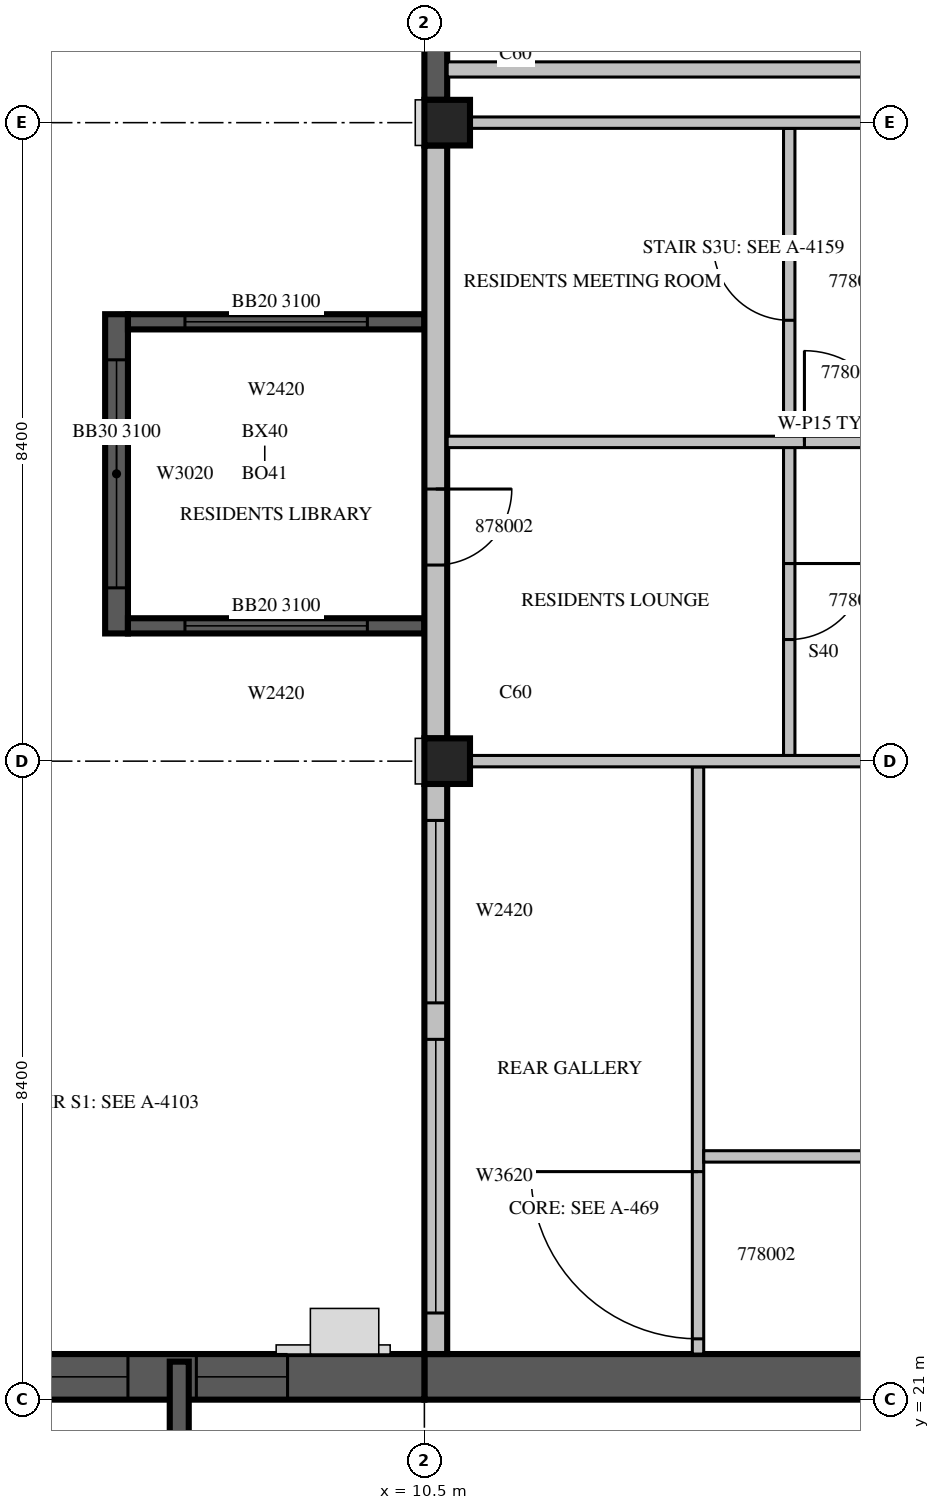
"""IFC4 building model, lengths in metres.
Left out: names, types, materials, properties, quantities, classifications, styles, units other than length and angle.
Written with IfcOpenShell. Run it as: python <this file> out.ifc"""

import sys

from ifc_helpers import new_model, si_unit, direction, frame, frame_2d, origin, origin_2d, place, context, subcontext, project, spatial, rectangle, extrude, source, transform, mapped, element, fill, save


model = new_model("IFC4")
c1 = context("Model", 3, precision=1e-05, world=origin(), true_north=direction((0.0, 1.0)))
c2 = subcontext(c1, "Body", "Model", "MODEL_VIEW")
j1 = project(units=[si_unit("LENGTHUNIT", "METRE"), si_unit("PLANEANGLEUNIT", "RADIAN")], contexts=[c1])
p1 = place(None, origin())
s1 = spatial("IfcSite", under=j1, at=p1, CompositionType="ELEMENT")
p2 = place(p1, origin())
s2 = spatial("IfcBuilding", under=s1, at=p2, CompositionType="ELEMENT")
p3 = place(p2, frame((0.0, 0.0, 333.5)))
s3 = spatial("IfcBuildingStorey", under=s2, at=p3, CompositionType="ELEMENT", Elevation=333.5)
m1 = source(origin(), c2, "Body", "SweptSolid", [
    extrude(rectangle(XDim=0.6, YDim=0.6, at=origin_2d()), origin(), (0.0, 0.0, 1.0), 3.5),
])
for number, where, z_axis, x_axis in (
    (1, (10.8, 29.4, 0.0), (0.0, 0.0, 1.0), (1.0, 0.0, 0.0)),
    (2, (10.8, 37.8, 0.0), (0.0, 0.0, 1.0), (1.0, 0.0, 0.0)),
):
    element("IfcColumn", number, at=place(p3, frame(where, z_axis=z_axis, x_axis=x_axis)), inside=s3, PredefinedType="COLUMN", context=c2, shape_type="MappedRepresentation", body=[
        mapped(m1, transform((0.0, 0.0, 0.0), scale=1.0)),
    ])
m2 = source(origin(), c2, "Body", "SweptSolid", [
    extrude(rectangle(XDim=11.1, YDim=0.6, at=frame_2d((5.55, 0.0))), origin(), (0.0, 0.0, 1.0), 3.5),
])
p4 = place(p3, frame((10.5, 21.3, 0.0), z_axis=(0.0, 0.0, 1.0), x_axis=(1.0, 0.0, 0.0)))
e3 = element("IfcWall", 3, at=p4, inside=s3, PredefinedType="SHEAR", context=c2, shape_type="MappedRepresentation", body=[
    mapped(m2, transform((0.0, 0.0, 0.0), scale=1.0)),
])
m3 = source(origin(), c2, "Body", "SweptSolid", [
    extrude(rectangle(XDim=1.2, YDim=2.1, at=frame_2d((0.6, 1.05))), frame((0.0, 0.31, 0.0), z_axis=(0.0, -1.0, 0.0), x_axis=(1.0, 0.0, 0.0)), (0.0, 0.0, 1.0), 0.62),
])
p5 = place(p4, frame((8.7, 0.0, 0.0)))
e4 = element("IfcOpeningElement", 4, at=p5, cuts=e3, PredefinedType="OPENING", context=c2, shape_type="MappedRepresentation", body=[
    mapped(m3, transform((0.0, 0.0, 0.0), scale=1.0)),
])
m4 = source(origin(), c2, "Body", "SweptSolid", [
    extrude(rectangle(XDim=6.6, YDim=0.6, at=frame_2d((3.3, 0.0))), origin(), (0.0, 0.0, 1.0), 3.5),
])
p6 = place(p3, frame((3.9, 21.3, 0.0), z_axis=(0.0, 0.0, 1.0), x_axis=(1.0, 0.0, 0.0)))
e5 = element("IfcWall", 5, at=p6, inside=s3, PredefinedType="SHEAR", context=c2, shape_type="MappedRepresentation", body=[
    mapped(m4, transform((0.0, 0.0, 0.0), scale=1.0)),
])
m5 = source(origin(), c2, "Body", "SweptSolid", [
    extrude(rectangle(XDim=1.2, YDim=2.4, at=frame_2d((0.6, 1.2))), frame((0.0, 0.31, 0.0), z_axis=(0.0, -1.0, 0.0), x_axis=(1.0, 0.0, 0.0)), (0.0, 0.0, 1.0), 0.62),
])
p7 = place(p6, frame((1.5, 0.0, 0.6)))
e6 = element("IfcOpeningElement", 6, at=p7, cuts=e5, PredefinedType="OPENING", context=c2, shape_type="MappedRepresentation", body=[
    mapped(m5, transform((0.0, 0.0, 0.0), scale=1.0)),
])
p8 = place(p6, frame((3.6, 0.0, 0.6)))
e7 = element("IfcOpeningElement", 7, at=p8, cuts=e5, PredefinedType="OPENING", context=c2, shape_type="MappedRepresentation", body=[
    mapped(m5, transform((0.0, 0.0, 0.0), scale=1.0)),
])
m6 = source(origin(), c2, "Body", "SweptSolid", [
    extrude(rectangle(XDim=4.2, YDim=0.3, at=frame_2d((2.1, 0.0))), origin(), (0.0, 0.0, 1.0), 3.1),
])
p9 = place(p3, frame((6.45, 35.28, 0.0), z_axis=(0.0, 0.0, 1.0), x_axis=(0.0, -1.0, 0.0)))
e8 = element("IfcWall", 8, at=p9, inside=s3, PredefinedType="SOLIDWALL", context=c2, shape_type="MappedRepresentation", body=[
    mapped(m6, transform((0.0, 0.0, 0.0), scale=1.0)),
])
m7 = source(origin(), c2, "Body", "SweptSolid", [
    extrude(rectangle(XDim=3.0, YDim=2.0, at=frame_2d((1.5, 1.0))), frame((0.0, 0.16, 0.0), z_axis=(0.0, -1.0, 0.0), x_axis=(1.0, 0.0, 0.0)), (0.0, 0.0, 1.0), 0.32),
])
p10 = place(p9, frame((0.6, 0.0, 0.6)))
e9 = element("IfcOpeningElement", 9, at=p10, cuts=e8, PredefinedType="OPENING", context=c2, shape_type="MappedRepresentation", body=[
    mapped(m7, transform((0.0, 0.0, 0.0), scale=1.0)),
])
m8 = source(origin(), c2, "Body", "SweptSolid", [
    extrude(rectangle(XDim=3.9, YDim=0.2, at=frame_2d((1.95, 0.0))), origin(), (0.0, 0.0, 1.0), 3.1),
])
p11 = place(p3, frame((10.5, 35.18, 0.0), z_axis=(0.0, 0.0, 1.0), x_axis=(-1.0, 0.0, 0.0)))
e10 = element("IfcWall", 10, at=p11, inside=s3, PredefinedType="SOLIDWALL", context=c2, shape_type="MappedRepresentation", body=[
    mapped(m8, transform((0.0, 0.0, 0.0), scale=1.0)),
])
m9 = source(origin(), c2, "Body", "SweptSolid", [
    extrude(rectangle(XDim=2.4, YDim=2.0, at=frame_2d((1.2, 1.0))), frame((0.0, 0.11, 0.0), z_axis=(0.0, -1.0, 0.0), x_axis=(1.0, 0.0, 0.0)), (0.0, 0.0, 1.0), 0.22),
])
p12 = place(p11, frame((0.75, 0.0, 0.6)))
e11 = element("IfcOpeningElement", 11, at=p12, cuts=e10, PredefinedType="OPENING", context=c2, shape_type="MappedRepresentation", body=[
    mapped(m9, transform((0.0, 0.0, 0.0), scale=1.0)),
])
p13 = place(p3, frame((10.5, 31.18, 0.0), z_axis=(0.0, 0.0, 1.0), x_axis=(-1.0, 0.0, 0.0)))
e12 = element("IfcWall", 12, at=p13, inside=s3, PredefinedType="SOLIDWALL", context=c2, shape_type="MappedRepresentation", body=[
    mapped(m8, transform((0.0, 0.0, 0.0), scale=1.0)),
])
p14 = place(p13, frame((0.75, 0.0, 0.6)))
e13 = element("IfcOpeningElement", 13, at=p14, cuts=e12, PredefinedType="OPENING", context=c2, shape_type="MappedRepresentation", body=[
    mapped(m9, transform((0.0, 0.0, 0.0), scale=1.0)),
])
m10 = source(origin(), c2, "Body", "SweptSolid", [
    extrude(rectangle(XDim=5.58, YDim=0.3, at=frame_2d((2.79, 0.0))), origin(), (0.0, 0.0, 1.0), 3.1),
])
p15 = place(p3, frame((10.65, 43.68, 0.0), z_axis=(0.0, 0.0, 1.0), x_axis=(0.0, -1.0, 0.0)))
e14 = element("IfcWall", 14, at=p15, inside=s3, PredefinedType="SOLIDWALL", context=c2, shape_type="MappedRepresentation", body=[
    mapped(m10, transform((0.0, 0.0, 0.0), scale=1.0)),
])
m11 = source(origin(), c2, "Body", "SweptSolid", [
    extrude(rectangle(XDim=7.8, YDim=0.3, at=frame_2d((3.9, 0.0))), origin(), (0.0, 0.0, 1.0), 3.1),
])
p16 = place(p3, frame((10.65, 37.5, 0.0), z_axis=(0.0, 0.0, 1.0), x_axis=(0.0, -1.0, 0.0)))
e15 = element("IfcWall", 15, at=p16, inside=s3, PredefinedType="STANDARD", context=c2, shape_type="MappedRepresentation", body=[
    mapped(m11, transform((0.0, 0.0, 0.0), scale=1.0)),
])
m12 = source(origin(), c2, "Body", "SweptSolid", [
    extrude(rectangle(XDim=1.0, YDim=2.1, at=frame_2d((0.5, 1.05))), frame((0.0, 0.16, 0.0), z_axis=(0.0, -1.0, 0.0), x_axis=(1.0, 0.0, 0.0)), (0.0, 0.0, 1.0), 0.32),
])
p17 = place(p16, frame((4.52, 0.0, 0.0)))
e16 = element("IfcOpeningElement", 16, at=p17, cuts=e15, PredefinedType="OPENING", context=c2, shape_type="MappedRepresentation", body=[
    mapped(m12, transform((0.0, 0.0, 0.0), scale=1.0)),
])
m13 = source(origin(), c2, "Body", "SweptSolid", [
    extrude(rectangle(XDim=7.5, YDim=0.3, at=frame_2d((3.75, 0.0))), origin(), (0.0, 0.0, 1.0), 3.1),
])
p18 = place(p3, frame((10.65, 29.1, 0.0), z_axis=(0.0, 0.0, 1.0), x_axis=(0.0, -1.0, 0.0)))
e17 = element("IfcWall", 17, at=p18, inside=s3, PredefinedType="STANDARD", context=c2, shape_type="MappedRepresentation", body=[
    mapped(m13, transform((0.0, 0.0, 0.0), scale=1.0)),
])
m14 = source(origin(), c2, "Body", "SweptSolid", [
    extrude(rectangle(XDim=3.6, YDim=2.0, at=frame_2d((1.8, 1.0))), frame((0.0, 0.16, 0.0), z_axis=(0.0, -1.0, 0.0), x_axis=(1.0, 0.0, 0.0)), (0.0, 0.0, 1.0), 0.32),
])
p19 = place(p18, frame((3.36, 0.0, 0.6)))
e18 = element("IfcOpeningElement", 18, at=p19, cuts=e17, PredefinedType="OPENING", context=c2, shape_type="MappedRepresentation", body=[
    mapped(m14, transform((0.0, 0.0, 0.0), scale=1.0)),
])
m15 = source(origin(), c2, "Body", "SweptSolid", [
    extrude(rectangle(XDim=2.4, YDim=2.0, at=frame_2d((1.2, 1.0))), frame((0.0, 0.16, 0.0), z_axis=(0.0, -1.0, 0.0), x_axis=(1.0, 0.0, 0.0)), (0.0, 0.0, 1.0), 0.32),
])
p20 = place(p18, frame((0.48, 0.0, 0.6)))
e19 = element("IfcOpeningElement", 19, at=p20, cuts=e17, PredefinedType="OPENING", context=c2, shape_type="MappedRepresentation", body=[
    mapped(m15, transform((0.0, 0.0, 0.0), scale=1.0)),
])
m16 = source(origin(), c2, "Body", "SweptSolid", [
    extrude(rectangle(XDim=6.6, YDim=0.25, at=frame_2d((3.3, 0.0))), origin(), (0.0, 0.0, 1.0), 3.1),
])
p21 = place(p3, frame((7.275, 14.9, 0.0), z_axis=(0.0, 0.0, 1.0), x_axis=(0.0, 1.0, 0.0)))
e20 = element("IfcWall", 20, at=p21, inside=s3, PredefinedType="SOLIDWALL", context=c2, shape_type="MappedRepresentation", body=[
    mapped(m16, transform((0.0, 0.0, 0.0), scale=1.0)),
])
m17 = source(origin(), c2, "Body", "SweptSolid", [
    extrude(rectangle(XDim=1.1, YDim=2.1, at=frame_2d((0.55, 1.05))), frame((0.0, 0.135, 0.0), z_axis=(0.0, -1.0, 0.0), x_axis=(1.0, 0.0, 0.0)), (0.0, 0.0, 1.0), 0.27),
])
p22 = place(p21, frame((0.15, 0.0, 0.0)))
e21 = element("IfcOpeningElement", 21, at=p22, cuts=e20, PredefinedType="OPENING", context=c2, shape_type="MappedRepresentation", body=[
    mapped(m17, transform((0.0, 0.0, 0.0), scale=1.0)),
])
m18 = source(origin(), c2, "Body", "SweptSolid", [
    extrude(rectangle(XDim=8.0, YDim=0.2, at=frame_2d((4.0, 0.0))), origin(), (0.0, 0.0, 1.0), 3.1),
])
p23 = place(p3, frame((10.8, 38.5, 0.0), z_axis=(0.0, 0.0, 1.0), x_axis=(1.0, 0.0, 0.0)))
e22 = element("IfcWall", 22, at=p23, inside=s3, PredefinedType="PARTITIONING", context=c2, shape_type="MappedRepresentation", body=[
    mapped(m18, transform((0.0, 0.0, 0.0), scale=1.0)),
])
m19 = source(origin(), c2, "Body", "SweptSolid", [
    extrude(rectangle(XDim=7.725, YDim=0.15, at=frame_2d((3.862, 0.0))), origin(), (0.0, 0.0, 1.0), 3.1),
])
p24 = place(p3, frame((14.1, 29.325, 0.0), z_axis=(0.0, 0.0, 1.0), x_axis=(0.0, -1.0, 0.0)))
e23 = element("IfcWall", 23, at=p24, inside=s3, PredefinedType="PARTITIONING", context=c2, shape_type="MappedRepresentation", body=[
    mapped(m19, transform((0.0, 0.0, 0.0), scale=1.0)),
])
m20 = source(origin(), c2, "Body", "SweptSolid", [
    extrude(rectangle(XDim=2.2, YDim=2.1, at=frame_2d((1.1, 1.05))), frame((0.0, 0.085, 0.0), z_axis=(0.0, -1.0, 0.0), x_axis=(1.0, 0.0, 0.0)), (0.0, 0.0, 1.0), 0.17),
])
p25 = place(p24, frame((5.325, 0.0, 0.0)))
e24 = element("IfcOpeningElement", 24, at=p25, cuts=e23, PredefinedType="OPENING", context=c2, shape_type="MappedRepresentation", body=[
    mapped(m20, transform((0.0, 0.0, 0.0), scale=1.0)),
])
m21 = source(origin(), c2, "Body", "SweptSolid", [
    extrude(rectangle(XDim=6.62, YDim=0.15, at=frame_2d((3.31, 0.0))), origin(), (0.0, 0.0, 1.0), 3.1),
])
p26 = place(p3, frame((14.175, 24.2, 0.0), z_axis=(0.0, 0.0, 1.0), x_axis=(1.0, 0.0, 0.0)))
e25 = element("IfcWall", 25, at=p26, inside=s3, PredefinedType="PARTITIONING", context=c2, shape_type="MappedRepresentation", body=[
    mapped(m21, transform((0.0, 0.0, 0.0), scale=1.0)),
])
m22 = source(origin(), c2, "Body", "SweptSolid", [
    extrude(rectangle(XDim=1.2, YDim=2.1, at=frame_2d((0.6, 1.05))), frame((0.0, 0.085, 0.0), z_axis=(0.0, -1.0, 0.0), x_axis=(1.0, 0.0, 0.0)), (0.0, 0.0, 1.0), 0.17),
])
p27 = place(p26, frame((2.812, 0.0, 0.0)))
e26 = element("IfcOpeningElement", 26, at=p27, cuts=e25, PredefinedType="OPENING", context=c2, shape_type="MappedRepresentation", body=[
    mapped(m22, transform((0.0, 0.0, 0.0), scale=1.0)),
])
p28 = place(p3, frame((15.3, 33.6, 0.0), z_axis=(0.0, 0.0, 1.0), x_axis=(0.0, -1.0, 0.0)))
e27 = element("IfcWall", 27, at=p28, inside=s3, PredefinedType="PARTITIONING", context=c2, shape_type="SweptSolid", body=[
    extrude(rectangle(XDim=4.2, YDim=0.15, at=frame_2d((2.1, 0.0))), origin(), (0.0, 0.0, 1.0), 3.1),
])
m23 = source(origin(), c2, "Body", "SweptSolid", [
    extrude(rectangle(XDim=1.0, YDim=2.1, at=frame_2d((0.5, 1.05))), frame((0.0, 0.085, 0.0), z_axis=(0.0, -1.0, 0.0), x_axis=(1.0, 0.0, 0.0)), (0.0, 0.0, 1.0), 0.17),
])
p29 = place(p28, frame((1.6, 0.0, 0.0)))
e28 = element("IfcOpeningElement", 28, at=p29, cuts=e27, PredefinedType="OPENING", context=c2, shape_type="MappedRepresentation", body=[
    mapped(m23, transform((0.0, 0.0, 0.0), scale=1.0)),
])
p30 = place(p3, frame((15.3, 37.725, 0.0), z_axis=(0.0, 0.0, 1.0), x_axis=(0.0, -1.0, 0.0)))
e29 = element("IfcWall", 29, at=p30, inside=s3, PredefinedType="PARTITIONING", context=c2, shape_type="SweptSolid", body=[
    extrude(rectangle(XDim=4.105, YDim=0.15, at=frame_2d((2.053, 0.0))), origin(), (0.0, 0.0, 1.0), 3.1),
])
p31 = place(p30, frame((1.525, 0.0, 0.0)))
e30 = element("IfcOpeningElement", 30, at=p31, cuts=e29, PredefinedType="OPENING", context=c2, shape_type="MappedRepresentation", body=[
    mapped(m23, transform((0.0, 0.0, 0.0), scale=1.0)),
])
m24 = source(origin(), c2, "Body", "SweptSolid", [
    extrude(rectangle(XDim=9.302, YDim=0.15, at=frame_2d((4.651, 0.0))), origin(), (0.0, 0.0, 1.0), 3.1),
])
p32 = place(p3, frame((11.099, 29.4, 0.0), z_axis=(0.0, 0.0, 1.0), x_axis=(1.0, 0.0, 0.0)))
e31 = element("IfcWall", 31, at=p32, inside=s3, PredefinedType="PARTITIONING", context=c2, shape_type="MappedRepresentation", body=[
    mapped(m24, transform((0.0, 0.0, 0.0), scale=1.0)),
])
p33 = place(p32, frame((7.088, 0.0, 0.0)))
e32 = element("IfcOpeningElement", 32, at=p33, cuts=e31, PredefinedType="OPENING", context=c2, shape_type="MappedRepresentation", body=[
    mapped(m22, transform((0.0, 0.0, 0.0), scale=1.0)),
])
p34 = place(p3, frame((10.8, 33.6, 0.0), z_axis=(0.0, 0.0, 1.0), x_axis=(1.0, 0.0, 0.0)))
e33 = element("IfcWall", 33, at=p34, inside=s3, PredefinedType="PARTITIONING", context=c2, shape_type="SweptSolid", body=[
    extrude(rectangle(XDim=9.995, YDim=0.15, at=frame_2d((4.997, 0.0))), origin(), (0.0, 0.0, 1.0), 3.1),
])
p35 = place(p34, frame((4.7, 0.0, 0.0)))
e34 = element("IfcOpeningElement", 34, at=p35, cuts=e33, PredefinedType="OPENING", context=c2, shape_type="MappedRepresentation", body=[
    mapped(m22, transform((0.0, 0.0, 0.0), scale=1.0)),
])
p36 = place(p3, frame((20.401, 37.8, 0.0), z_axis=(0.0, 0.0, 1.0), x_axis=(-1.0, 0.0, 0.0)))
e35 = element("IfcWall", 35, at=p36, inside=s3, PredefinedType="PARTITIONING", context=c2, shape_type="MappedRepresentation", body=[
    mapped(m24, transform((0.0, 0.0, 0.0), scale=1.0)),
])
m25 = source(origin(), c2, "Body", "SweptSolid", [
    extrude(rectangle(XDim=0.9, YDim=2.1, at=frame_2d((0.45, 1.05))), frame((0.0, 0.085, 0.0), z_axis=(0.0, -1.0, 0.0), x_axis=(1.0, 0.0, 0.0)), (0.0, 0.0, 1.0), 0.17),
])
p37 = place(p36, frame((0.401, 0.0, 0.0)))
e36 = element("IfcOpeningElement", 36, at=p37, cuts=e35, PredefinedType="OPENING", context=c2, shape_type="MappedRepresentation", body=[
    mapped(m25, transform((0.0, 0.0, 0.0), scale=1.0)),
])
m26 = source(origin(), c2, "Body", "SweptSolid", [
    extrude(rectangle(XDim=3.0, YDim=2.0, at=frame_2d((1.5, 1.0))), frame((0.0, 0.03, 0.0), z_axis=(0.0, -1.0, 0.0), x_axis=(1.0, 0.0, 0.0)), (0.0, 0.0, 1.0), 0.06),
])
p38 = place(p10, origin())
e37 = element("IfcWindow", 37, at=p38, inside=s3, PartitioningType="SINGLE_PANEL", PredefinedType="WINDOW", context=c2, shape_type="MappedRepresentation", body=[
    mapped(m26, transform((0.0, 0.0, 0.0), scale=1.0)),
])
fill(e9, e37)
m27 = source(origin(), c2, "Body", "SweptSolid", [
    extrude(rectangle(XDim=2.4, YDim=2.0, at=frame_2d((1.2, 1.0))), frame((0.0, 0.03, 0.0), z_axis=(0.0, -1.0, 0.0), x_axis=(1.0, 0.0, 0.0)), (0.0, 0.0, 1.0), 0.06),
])
p39 = place(p12, origin())
e38 = element("IfcWindow", 38, at=p39, inside=s3, PartitioningType="SINGLE_PANEL", PredefinedType="WINDOW", context=c2, shape_type="MappedRepresentation", body=[
    mapped(m27, transform((0.0, 0.0, 0.0), scale=1.0)),
])
fill(e11, e38)
p40 = place(p14, origin())
e39 = element("IfcWindow", 39, at=p40, inside=s3, PartitioningType="SINGLE_PANEL", PredefinedType="WINDOW", context=c2, shape_type="MappedRepresentation", body=[
    mapped(m27, transform((0.0, 0.0, 0.0), scale=1.0)),
])
fill(e13, e39)
m28 = source(origin(), c2, "Body", "SweptSolid", [
    extrude(rectangle(XDim=3.6, YDim=2.0, at=frame_2d((1.8, 1.0))), frame((0.0, 0.03, 0.0), z_axis=(0.0, -1.0, 0.0), x_axis=(1.0, 0.0, 0.0)), (0.0, 0.0, 1.0), 0.06),
])
p41 = place(p19, origin())
e40 = element("IfcWindow", 40, at=p41, inside=s3, PartitioningType="SINGLE_PANEL", PredefinedType="WINDOW", context=c2, shape_type="MappedRepresentation", body=[
    mapped(m28, transform((0.0, 0.0, 0.0), scale=1.0)),
])
fill(e18, e40)
p42 = place(p20, origin())
e41 = element("IfcWindow", 41, at=p42, inside=s3, PartitioningType="SINGLE_PANEL", PredefinedType="WINDOW", context=c2, shape_type="MappedRepresentation", body=[
    mapped(m27, transform((0.0, 0.0, 0.0), scale=1.0)),
])
fill(e19, e41)
m29 = source(origin(), c2, "Body", "SweptSolid", [
    extrude(rectangle(XDim=1.2, YDim=2.4, at=frame_2d((0.6, 1.2))), frame((0.0, 0.03, 0.0), z_axis=(0.0, -1.0, 0.0), x_axis=(1.0, 0.0, 0.0)), (0.0, 0.0, 1.0), 0.06),
])
p43 = place(p7, origin())
e42 = element("IfcWindow", 42, at=p43, inside=s3, PartitioningType="SINGLE_PANEL", PredefinedType="WINDOW", context=c2, shape_type="MappedRepresentation", body=[
    mapped(m29, transform((0.0, 0.0, 0.0), scale=1.0)),
])
fill(e6, e42)
p44 = place(p8, origin())
e43 = element("IfcWindow", 43, at=p44, inside=s3, PartitioningType="SINGLE_PANEL", PredefinedType="WINDOW", context=c2, shape_type="MappedRepresentation", body=[
    mapped(m29, transform((0.0, 0.0, 0.0), scale=1.0)),
])
fill(e7, e43)
m30 = source(origin(), c2, "Body", "SweptSolid", [
    extrude(rectangle(XDim=2.2, YDim=2.1, at=frame_2d((1.1, 1.05))), frame((0.0, 0.025, 0.0), z_axis=(0.0, -1.0, 0.0), x_axis=(1.0, 0.0, 0.0)), (0.0, 0.0, 1.0), 0.05),
])
p45 = place(p25, origin())
e44 = element("IfcDoor", 44, at=p45, inside=s3, OperationType="DOUBLE_DOOR_SINGLE_SWING", PredefinedType="DOOR", context=c2, shape_type="MappedRepresentation", body=[
    mapped(m30, transform((0.0, 0.0, 0.0), scale=1.0)),
])
fill(e24, e44)
m31 = source(origin(), c2, "Body", "SweptSolid", [
    extrude(rectangle(XDim=1.0, YDim=2.1, at=frame_2d((0.5, 1.05))), frame((0.0, 0.025, 0.0), z_axis=(0.0, -1.0, 0.0), x_axis=(1.0, 0.0, 0.0)), (0.0, 0.0, 1.0), 0.05),
])
p46 = place(p29, origin())
e45 = element("IfcDoor", 45, at=p46, inside=s3, OperationType="SINGLE_SWING_LEFT", PredefinedType="DOOR", context=c2, shape_type="MappedRepresentation", body=[
    mapped(m31, transform((0.0, 0.0, 0.0), scale=1.0)),
])
fill(e28, e45)
p47 = place(p31, origin())
e46 = element("IfcDoor", 46, at=p47, inside=s3, OperationType="SINGLE_SWING_RIGHT", PredefinedType="DOOR", context=c2, shape_type="MappedRepresentation", body=[
    mapped(m31, transform((0.0, 0.0, 0.0), scale=1.0)),
])
fill(e30, e46)
m32 = source(origin(), c2, "Body", "SweptSolid", [
    extrude(rectangle(XDim=1.2, YDim=2.1, at=frame_2d((0.6, 1.05))), frame((0.0, 0.025, 0.0), z_axis=(0.0, -1.0, 0.0), x_axis=(1.0, 0.0, 0.0)), (0.0, 0.0, 1.0), 0.05),
])
p48 = place(p35, origin())
e47 = element("IfcDoor", 47, at=p48, inside=s3, OperationType="SINGLE_SWING_LEFT", PredefinedType="DOOR", context=c2, shape_type="MappedRepresentation", body=[
    mapped(m32, transform((0.0, 0.0, 0.0), scale=1.0)),
])
fill(e34, e47)
p49 = place(p17, origin())
e48 = element("IfcDoor", 48, at=p49, inside=s3, OperationType="SINGLE_SWING_LEFT", PredefinedType="DOOR", context=c2, shape_type="MappedRepresentation", body=[
    mapped(m31, transform((0.0, 0.0, 0.0), scale=1.0)),
])
fill(e16, e48)
save(model, sys.argv[1])
